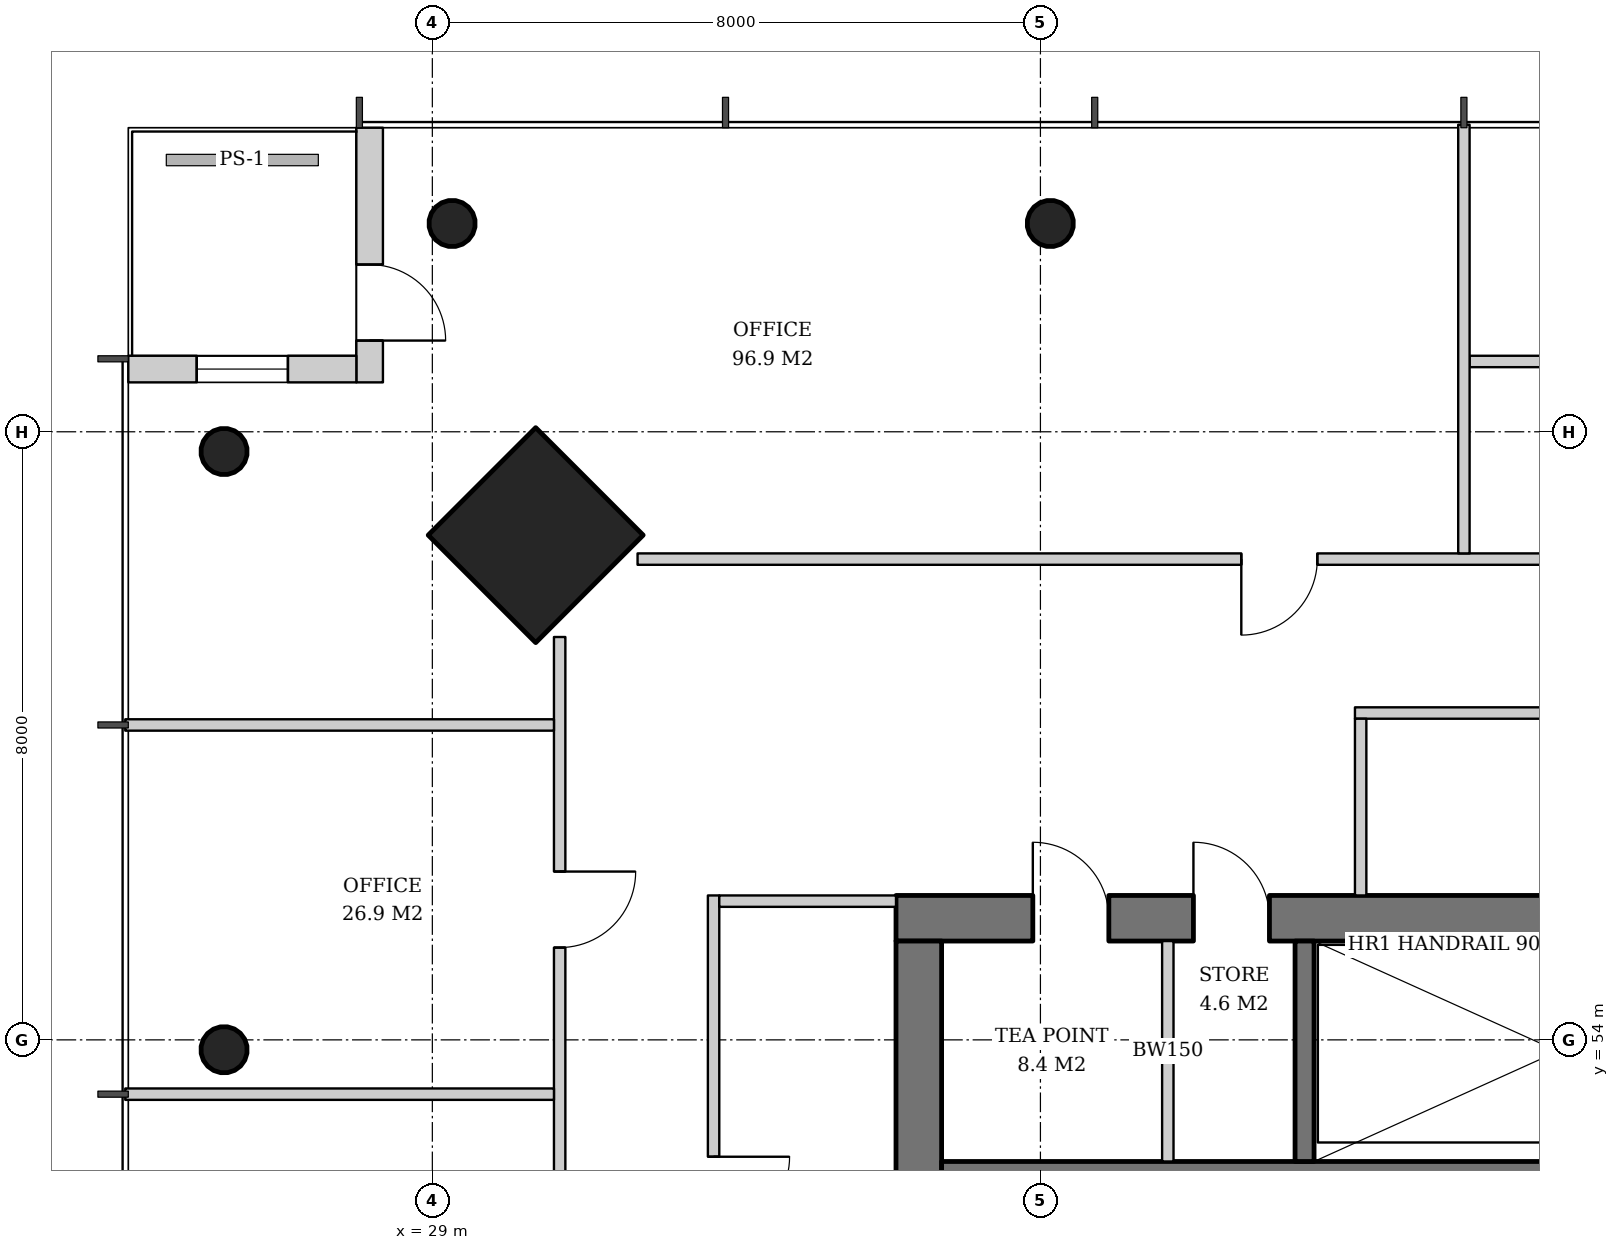
"""IFC4 building model, lengths in metres.
Left out: names, types, materials, properties, quantities, classifications, styles, units other than length and angle.
Written with IfcOpenShell. Run it as: python <this file> out.ifc"""

import sys

from ifc_helpers import new_model, si_unit, direction, frame, frame_2d, origin, origin_2d, place, context, subcontext, project, spatial, rectangle, hollow_circle, extrude, element, fill, save


model = new_model("IFC4")
c1 = context("Model", 3, precision=1e-05, world=origin(), true_north=direction((0.0, 1.0)))
c2 = subcontext(c1, "Body", "Model", "MODEL_VIEW")
j1 = project(units=[si_unit("LENGTHUNIT", "METRE"), si_unit("PLANEANGLEUNIT", "RADIAN")], contexts=[c1])
p1 = place(None, origin())
s1 = spatial("IfcSite", under=j1, at=p1, CompositionType="ELEMENT")
p2 = place(p1, origin())
s2 = spatial("IfcBuilding", under=s1, at=p2, CompositionType="ELEMENT")
p3 = place(p2, frame((0.0, 0.0, 184.4)))
s3 = spatial("IfcBuildingStorey", under=s2, at=p3, CompositionType="ELEMENT", Elevation=184.4)
p4 = place(p3, frame((30.322, 60.678, 0.0), z_axis=(0.031898107953, -0.031898107953, 0.998981992539), x_axis=(0.707106781187, 0.707106781187, 0.0)))
e1 = element("IfcColumn", 1, at=p4, inside=s3, PredefinedType="COLUMN", context=c2, shape_type="SweptSolid", body=[
    extrude(rectangle(XDim=2.0, YDim=2.0, at=origin_2d()), origin(), (0.0, 0.0, 1.0), 3.804),
])
p5 = place(p3, frame((29.221, 64.779, 0.0), z_axis=(0.031898107953, -0.031898107953, 0.998981992539), x_axis=(0.707106781187, 0.707106781187, 0.0)))
e2 = element("IfcColumn", 2, at=p5, inside=s3, PredefinedType="COLUMN", context=c2, shape_type="SweptSolid", body=[
    extrude(hollow_circle(Radius=0.305, WallThickness=0.025, at=origin_2d()), origin(), (0.0, 0.0, 1.0), 3.804),
])
p6 = place(p3, frame((37.111, 64.779, 0.0), z_axis=(0.015987237665, -0.031910269556, 0.999362868496), x_axis=(0.894067115991, 0.447933021895, 0.0)))
e3 = element("IfcColumn", 3, at=p6, inside=s3, PredefinedType="COLUMN", context=c2, shape_type="SweptSolid", body=[
    extrude(hollow_circle(Radius=0.305, WallThickness=0.025, at=origin_2d()), origin(), (0.0, 0.0, 1.0), 3.802),
])
p7 = place(p3, frame((26.221, 61.779, 0.0), z_axis=(0.031898107953, -0.031898107953, 0.998981992539), x_axis=(0.707106781187, 0.707106781187, 0.0)))
e4 = element("IfcColumn", 4, at=p7, inside=s3, PredefinedType="COLUMN", context=c2, shape_type="SweptSolid", body=[
    extrude(hollow_circle(Radius=0.305, WallThickness=0.025, at=origin_2d()), origin(), (0.0, 0.0, 1.0), 3.804),
])
p8 = place(p3, frame((26.221, 53.889, 0.0), z_axis=(0.031910269556, -0.015987237665, 0.999362868496), x_axis=(0.447933021895, 0.894067115991, 0.0)))
e5 = element("IfcColumn", 5, at=p8, inside=s3, PredefinedType="COLUMN", context=c2, shape_type="SweptSolid", body=[
    extrude(hollow_circle(Radius=0.305, WallThickness=0.025, at=origin_2d()), origin(), (0.0, 0.0, 1.0), 3.802),
])
p9 = place(p3, frame((35.1, 55.6, 0.0), z_axis=(0.0, 0.0, 1.0), x_axis=(1.0, 0.0, 0.0)))
e6 = element("IfcWall", 6, at=p9, inside=s3, PredefinedType="SHEAR", context=c2, shape_type="SweptSolid", body=[
    extrude(rectangle(XDim=19.8, YDim=0.6, at=frame_2d((9.9, 0.0))), origin(), (0.0, 0.0, 1.0), 3.8),
])
p10 = place(p9, frame((14.54, 0.0, 0.0)))
e7 = element("IfcOpeningElement", 7, at=p10, cuts=e6, PredefinedType="OPENING", context=c2, shape_type="SweptSolid", body=[
    extrude(rectangle(XDim=1.0, YDim=2.1, at=frame_2d((0.5, 1.05))), frame((0.0, 0.31, 0.0), z_axis=(0.0, -1.0, 0.0), x_axis=(1.0, 0.0, 0.0)), (0.0, 0.0, 1.0), 0.62),
])
p11 = place(p9, frame((1.8, 0.0, 0.0)))
e8 = element("IfcOpeningElement", 8, at=p11, cuts=e6, PredefinedType="OPENING", context=c2, shape_type="SweptSolid", body=[
    extrude(rectangle(XDim=1.0, YDim=2.1, at=frame_2d((0.5, 1.05))), frame((0.0, 0.31, 0.0), z_axis=(0.0, -1.0, 0.0), x_axis=(1.0, 0.0, 0.0)), (0.0, 0.0, 1.0), 0.62),
])
p12 = place(p9, frame((3.913, 0.0, 0.0)))
e9 = element("IfcOpeningElement", 9, at=p12, cuts=e6, PredefinedType="OPENING", context=c2, shape_type="SweptSolid", body=[
    extrude(rectangle(XDim=1.0, YDim=2.1, at=frame_2d((0.5, 1.05))), frame((0.0, 0.31, 0.0), z_axis=(0.0, -1.0, 0.0), x_axis=(1.0, 0.0, 0.0)), (0.0, 0.0, 1.0), 0.62),
])
p13 = place(p3, frame((35.4, 36.7, 0.0), z_axis=(0.0, 0.0, 1.0), x_axis=(0.0, 1.0, 0.0)))
e10 = element("IfcWall", 10, at=p13, inside=s3, PredefinedType="SHEAR", context=c2, shape_type="SweptSolid", body=[
    extrude(rectangle(XDim=18.6, YDim=0.6, at=frame_2d((9.3, 0.0))), origin(), (0.0, 0.0, 1.0), 3.8),
])
p14 = place(p13, frame((8.4, 0.0, 0.0)))
e11 = element("IfcOpeningElement", 11, at=p14, cuts=e10, PredefinedType="OPENING", context=c2, shape_type="SweptSolid", body=[
    extrude(rectangle(XDim=1.8, YDim=2.4, at=frame_2d((0.9, 1.2))), frame((0.0, 0.31, 0.0), z_axis=(0.0, -1.0, 0.0), x_axis=(1.0, 0.0, 0.0)), (0.0, 0.0, 1.0), 0.62),
])
p15 = place(p3, frame((35.7, 52.2, 0.0), z_axis=(0.0, 0.0, 1.0), x_axis=(1.0, 0.0, 0.0)))
e12 = element("IfcWall", 12, at=p15, inside=s3, PredefinedType="SHEAR", context=c2, shape_type="SweptSolid", body=[
    extrude(rectangle(XDim=18.6, YDim=0.4, at=frame_2d((9.3, 0.0))), origin(), (0.0, 0.0, 1.0), 3.8),
])
p16 = place(p3, frame((28.175, 66.0, 0.0), z_axis=(0.0, 0.0, 1.0), x_axis=(0.0, -1.0, 0.0)))
e13 = element("IfcWall", 13, at=p16, inside=s3, PredefinedType="SOLIDWALL", context=c2, shape_type="SweptSolid", body=[
    extrude(rectangle(XDim=3.35, YDim=0.35, at=frame_2d((1.675, 0.0))), origin(), (0.0, 0.0, 1.0), 3.62),
])
p17 = place(p16, frame((1.8, 0.0, 0.0)))
e14 = element("IfcOpeningElement", 14, at=p17, cuts=e13, PredefinedType="OPENING", context=c2, shape_type="SweptSolid", body=[
    extrude(rectangle(XDim=1.0, YDim=2.4, at=frame_2d((0.5, 1.2))), frame((0.0, 0.185, 0.0), z_axis=(0.0, -1.0, 0.0), x_axis=(1.0, 0.0, 0.0)), (0.0, 0.0, 1.0), 0.37),
])
p18 = place(p3, frame((28.0, 62.825, 0.0), z_axis=(0.0, 0.0, 1.0), x_axis=(-1.0, 0.0, 0.0)))
e15 = element("IfcWall", 15, at=p18, inside=s3, PredefinedType="SOLIDWALL", context=c2, shape_type="SweptSolid", body=[
    extrude(rectangle(XDim=3.0, YDim=0.35, at=frame_2d((1.5, 0.0))), origin(), (0.0, 0.0, 1.0), 3.62),
])
p19 = place(p18, frame((0.9, 0.0, 0.6)))
e16 = element("IfcOpeningElement", 16, at=p19, cuts=e15, PredefinedType="OPENING", context=c2, shape_type="SweptSolid", body=[
    extrude(rectangle(XDim=1.2, YDim=2.55, at=frame_2d((0.6, 1.275))), frame((0.0, 0.185, 0.0), z_axis=(0.0, -1.0, 0.0), x_axis=(1.0, 0.0, 0.0)), (0.0, 0.0, 1.0), 0.37),
])
p20 = place(p3, frame((40.475, 52.4, 0.0), z_axis=(0.0, 0.0, 1.0), x_axis=(0.0, 1.0, 0.0)))
e17 = element("IfcWall", 17, at=p20, inside=s3, PredefinedType="SHEAR", context=c2, shape_type="SweptSolid", body=[
    extrude(rectangle(XDim=2.9, YDim=0.25, at=frame_2d((1.45, 0.0))), origin(), (0.0, 0.0, 1.0), 3.8),
])
p21 = place(p3, frame((38.676, 52.4, 0.0), z_axis=(0.0, 0.0, 1.0), x_axis=(0.0, 1.0, 0.0)))
e18 = element("IfcWall", 18, at=p21, inside=s3, PredefinedType="SOLIDWALL", context=c2, shape_type="SweptSolid", body=[
    extrude(rectangle(XDim=2.9, YDim=0.15, at=frame_2d((1.45, 0.0))), origin(), (0.0, 0.0, 1.0), 3.62),
])
p22 = place(p3, frame((48.515, 58.3, 0.0), z_axis=(0.0, 0.0, 1.0), x_axis=(-1.0, 0.0, 0.0)))
e19 = element("IfcWall", 19, at=p22, inside=s3, PredefinedType="PARTITIONING", context=c2, shape_type="SweptSolid", body=[
    extrude(rectangle(XDim=7.377, YDim=0.15, at=frame_2d((3.688, 0.0))), origin(), (0.0, 0.0, 1.0), 2.867),
])
p23 = place(p22, frame((3.188, 0.0, 0.0)))
e20 = element("IfcOpeningElement", 20, at=p23, cuts=e19, PredefinedType="OPENING", context=c2, shape_type="SweptSolid", body=[
    extrude(rectangle(XDim=1.0, YDim=2.1, at=frame_2d((0.5, 1.05))), frame((0.0, 0.085, 0.0), z_axis=(0.0, -1.0, 0.0), x_axis=(1.0, 0.0, 0.0)), (0.0, 0.0, 1.0), 0.17),
])
p24 = place(p3, frame((41.213, 55.9, 0.0), z_axis=(0.0, 0.0, 1.0), x_axis=(0.0, 1.0, 0.0)))
e21 = element("IfcWall", 21, at=p24, inside=s3, PredefinedType="PARTITIONING", context=c2, shape_type="SweptSolid", body=[
    extrude(rectangle(XDim=2.325, YDim=0.15, at=frame_2d((1.163, 0.0))), origin(), (0.0, 0.0, 1.0), 3.62),
])
p25 = place(p3, frame((32.7, 55.9, 0.0), z_axis=(0.0, 0.0, 1.0), x_axis=(0.0, -1.0, 0.0)))
e22 = element("IfcWall", 22, at=p25, inside=s3, PredefinedType="PARTITIONING", context=c2, shape_type="SweptSolid", body=[
    extrude(rectangle(XDim=7.875, YDim=0.15, at=frame_2d((3.938, 0.0))), origin(), (0.0, 0.0, 1.0), 2.867),
])
p26 = place(p25, frame((3.438, 0.0, 0.0)))
e23 = element("IfcOpeningElement", 23, at=p26, cuts=e22, PredefinedType="OPENING", context=c2, shape_type="SweptSolid", body=[
    extrude(rectangle(XDim=1.0, YDim=2.1, at=frame_2d((0.5, 1.05))), frame((0.0, 0.085, 0.0), z_axis=(0.0, -1.0, 0.0), x_axis=(1.0, 0.0, 0.0)), (0.0, 0.0, 1.0), 0.17),
])
p27 = place(p3, frame((35.1, 55.825, 0.0), z_axis=(0.0, 0.0, 1.0), x_axis=(-1.0, 0.0, 0.0)))
e24 = element("IfcWall", 24, at=p27, inside=s3, PredefinedType="PARTITIONING", context=c2, shape_type="SweptSolid", body=[
    extrude(rectangle(XDim=2.325, YDim=0.15, at=frame_2d((1.163, 0.0))), origin(), (0.0, 0.0, 1.0), 2.867),
])
p28 = place(p3, frame((47.354, 62.925, 0.0), z_axis=(0.0, 0.0, 1.0), x_axis=(-1.0, 0.0, 0.0)))
e25 = element("IfcWall", 25, at=p28, inside=s3, PredefinedType="PARTITIONING", context=c2, shape_type="SweptSolid", body=[
    extrude(rectangle(XDim=4.707, YDim=0.15, at=frame_2d((2.354, 0.0))), origin(), (0.0, 0.0, 1.0), 2.867),
])
p29 = place(p3, frame((58.3, 60.325, 0.0), z_axis=(0.0, 0.0, 1.0), x_axis=(-1.0, 0.0, 0.0)))
e26 = element("IfcWall", 26, at=p29, inside=s3, PredefinedType="PARTITIONING", context=c2, shape_type="SweptSolid", body=[
    extrude(rectangle(XDim=26.6, YDim=0.15, at=frame_2d((13.3, 0.0))), origin(), (0.0, 0.0, 1.0), 2.867),
])
p30 = place(p29, frame((3.086, 0.0, 0.0)))
e27 = element("IfcOpeningElement", 27, at=p30, cuts=e26, PredefinedType="OPENING", context=c2, shape_type="SweptSolid", body=[
    extrude(rectangle(XDim=1.0, YDim=2.1, at=frame_2d((0.5, 1.05))), frame((0.0, 0.085, 0.0), z_axis=(0.0, -1.0, 0.0), x_axis=(1.0, 0.0, 0.0)), (0.0, 0.0, 1.0), 0.17),
])
p31 = place(p29, frame((7.943, 0.0, 0.0)))
e28 = element("IfcOpeningElement", 28, at=p31, cuts=e26, PredefinedType="OPENING", context=c2, shape_type="SweptSolid", body=[
    extrude(rectangle(XDim=1.0, YDim=2.1, at=frame_2d((0.5, 1.05))), frame((0.0, 0.085, 0.0), z_axis=(0.0, -1.0, 0.0), x_axis=(1.0, 0.0, 0.0)), (0.0, 0.0, 1.0), 0.17),
])
p32 = place(p29, frame((12.8, 0.0, 0.0)))
e29 = element("IfcOpeningElement", 29, at=p32, cuts=e26, PredefinedType="OPENING", context=c2, shape_type="SweptSolid", body=[
    extrude(rectangle(XDim=1.0, YDim=2.1, at=frame_2d((0.5, 1.05))), frame((0.0, 0.085, 0.0), z_axis=(0.0, -1.0, 0.0), x_axis=(1.0, 0.0, 0.0)), (0.0, 0.0, 1.0), 0.17),
])
p33 = place(p29, frame((17.657, 0.0, 0.0)))
e30 = element("IfcOpeningElement", 30, at=p33, cuts=e26, PredefinedType="OPENING", context=c2, shape_type="SweptSolid", body=[
    extrude(rectangle(XDim=1.0, YDim=2.1, at=frame_2d((0.5, 1.05))), frame((0.0, 0.085, 0.0), z_axis=(0.0, -1.0, 0.0), x_axis=(1.0, 0.0, 0.0)), (0.0, 0.0, 1.0), 0.17),
])
p34 = place(p3, frame((42.572, 60.4, 0.0), z_axis=(0.0, 0.0, 1.0), x_axis=(0.0, 1.0, 0.0)))
e31 = element("IfcWall", 31, at=p34, inside=s3, PredefinedType="PARTITIONING", context=c2, shape_type="SweptSolid", body=[
    extrude(rectangle(XDim=5.64, YDim=0.15, at=frame_2d((2.82, 0.0))), origin(), (0.0, 0.0, 1.0), 2.867),
])
p35 = place(p3, frame((30.675, 59.3, 0.0), z_axis=(0.0, 0.0, 1.0), x_axis=(0.0, -1.0, 0.0)))
e32 = element("IfcWall", 32, at=p35, inside=s3, PredefinedType="PARTITIONING", context=c2, shape_type="SweptSolid", body=[
    extrude(rectangle(XDim=26.6, YDim=0.15, at=frame_2d((13.3, 0.0))), origin(), (0.0, 0.0, 1.0), 2.867),
])
p36 = place(p35, frame((3.086, 0.0, 0.0)))
e33 = element("IfcOpeningElement", 33, at=p36, cuts=e32, PredefinedType="OPENING", context=c2, shape_type="SweptSolid", body=[
    extrude(rectangle(XDim=1.0, YDim=2.1, at=frame_2d((0.5, 1.05))), frame((0.0, 0.085, 0.0), z_axis=(0.0, -1.0, 0.0), x_axis=(1.0, 0.0, 0.0)), (0.0, 0.0, 1.0), 0.17),
])
p37 = place(p35, frame((7.543, 0.0, 0.0)))
e34 = element("IfcOpeningElement", 34, at=p37, cuts=e32, PredefinedType="OPENING", context=c2, shape_type="SweptSolid", body=[
    extrude(rectangle(XDim=1.8, YDim=2.4, at=frame_2d((0.9, 1.2))), frame((0.0, 0.085, 0.0), z_axis=(0.0, -1.0, 0.0), x_axis=(1.0, 0.0, 0.0)), (0.0, 0.0, 1.0), 0.17),
])
p38 = place(p35, frame((12.9, 0.0, 0.0)))
e35 = element("IfcOpeningElement", 35, at=p38, cuts=e32, PredefinedType="OPENING", context=c2, shape_type="SweptSolid", body=[
    extrude(rectangle(XDim=0.8, YDim=2.1, at=frame_2d((0.4, 1.05))), frame((0.0, 0.085, 0.0), z_axis=(0.0, -1.0, 0.0), x_axis=(1.0, 0.0, 0.0)), (0.0, 0.0, 1.0), 0.17),
])
p39 = place(p35, frame((17.657, 0.0, 0.0)))
e36 = element("IfcOpeningElement", 36, at=p39, cuts=e32, PredefinedType="OPENING", context=c2, shape_type="SweptSolid", body=[
    extrude(rectangle(XDim=1.0, YDim=2.1, at=frame_2d((0.5, 1.05))), frame((0.0, 0.085, 0.0), z_axis=(0.0, -1.0, 0.0), x_axis=(1.0, 0.0, 0.0)), (0.0, 0.0, 1.0), 0.17),
])
p40 = place(p35, frame((22.614, 0.0, 0.0)))
e37 = element("IfcOpeningElement", 37, at=p40, cuts=e32, PredefinedType="OPENING", context=c2, shape_type="SweptSolid", body=[
    extrude(rectangle(XDim=0.8, YDim=2.1, at=frame_2d((0.4, 1.05))), frame((0.0, 0.085, 0.0), z_axis=(0.0, -1.0, 0.0), x_axis=(1.0, 0.0, 0.0)), (0.0, 0.0, 1.0), 0.17),
])
for number, where, z_axis, x_axis in (
    (38, (30.6, 58.143, 0.0), (0.0, 0.0, 1.0), (-1.0, 0.0, 0.0)),
    (39, (30.6, 53.286, 0.0), (0.0, 0.0, 1.0), (-1.0, 0.0, 0.0)),
):
    element("IfcWall", number, at=place(p3, frame(where, z_axis=z_axis, x_axis=x_axis)), inside=s3, PredefinedType="PARTITIONING", context=c2, shape_type="SweptSolid", body=[
        extrude(rectangle(XDim=5.64, YDim=0.15, at=frame_2d((2.82, 0.0))), origin(), (0.0, 0.0, 1.0), 3.12),
    ])
p41 = place(p17, origin())
e40 = element("IfcDoor", 40, at=p41, inside=s3, OperationType="SINGLE_SWING_RIGHT", PredefinedType="DOOR", context=c2, shape_type="SweptSolid", body=[
    extrude(rectangle(XDim=1.0, YDim=2.4, at=frame_2d((0.5, 1.2))), frame((0.0, 0.025, 0.0), z_axis=(0.0, -1.0, 0.0), x_axis=(1.0, 0.0, 0.0)), (0.0, 0.0, 1.0), 0.05),
])
fill(e14, e40)
p42 = place(p19, origin())
e41 = element("IfcWindow", 41, at=p42, inside=s3, PartitioningType="SINGLE_PANEL", PredefinedType="WINDOW", context=c2, shape_type="SweptSolid", body=[
    extrude(rectangle(XDim=1.2, YDim=2.55, at=frame_2d((0.6, 1.275))), frame((0.0, 0.03, 0.0), z_axis=(0.0, -1.0, 0.0), x_axis=(1.0, 0.0, 0.0)), (0.0, 0.0, 1.0), 0.06),
])
fill(e16, e41)
p43 = place(p11, origin())
e42 = element("IfcDoor", 42, at=p43, inside=s3, OperationType="SINGLE_SWING_LEFT", PredefinedType="DOOR", context=c2, shape_type="SweptSolid", body=[
    extrude(rectangle(XDim=1.0, YDim=2.1, at=frame_2d((0.5, 1.05))), frame((0.0, -0.24, 0.0), z_axis=(0.0, -1.0, 0.0), x_axis=(1.0, 0.0, 0.0)), (0.0, 0.0, 1.0), 0.05),
])
fill(e8, e42)
p44 = place(p12, origin())
e43 = element("IfcDoor", 43, at=p44, inside=s3, OperationType="SINGLE_SWING_LEFT", PredefinedType="DOOR", context=c2, shape_type="SweptSolid", body=[
    extrude(rectangle(XDim=1.0, YDim=2.1, at=frame_2d((0.5, 1.05))), frame((0.0, -0.24, 0.0), z_axis=(0.0, -1.0, 0.0), x_axis=(1.0, 0.0, 0.0)), (0.0, 0.0, 1.0), 0.05),
])
fill(e9, e43)
p45 = place(p26, origin())
e44 = element("IfcDoor", 44, at=p45, inside=s3, OperationType="SINGLE_SWING_LEFT", PredefinedType="DOOR", context=c2, shape_type="SweptSolid", body=[
    extrude(rectangle(XDim=1.0, YDim=2.1, at=frame_2d((0.5, 1.05))), frame((0.0, 0.025, 0.0), z_axis=(0.0, -1.0, 0.0), x_axis=(1.0, 0.0, 0.0)), (0.0, 0.0, 1.0), 0.05),
])
fill(e23, e44)
p46 = place(p33, origin())
e45 = element("IfcDoor", 45, at=p46, inside=s3, OperationType="SINGLE_SWING_RIGHT", PredefinedType="DOOR", context=c2, shape_type="SweptSolid", body=[
    extrude(rectangle(XDim=1.0, YDim=2.1, at=frame_2d((0.5, 1.05))), frame((0.0, 0.025, 0.0), z_axis=(0.0, -1.0, 0.0), x_axis=(1.0, 0.0, 0.0)), (0.0, 0.0, 1.0), 0.05),
])
fill(e30, e45)
p47 = place(p36, origin())
e46 = element("IfcDoor", 46, at=p47, inside=s3, OperationType="SINGLE_SWING_LEFT", PredefinedType="DOOR", context=c2, shape_type="SweptSolid", body=[
    extrude(rectangle(XDim=1.0, YDim=2.1, at=frame_2d((0.5, 1.05))), frame((0.0, 0.025, 0.0), z_axis=(0.0, -1.0, 0.0), x_axis=(1.0, 0.0, 0.0)), (0.0, 0.0, 1.0), 0.05),
])
fill(e33, e46)
save(model, sys.argv[1])
